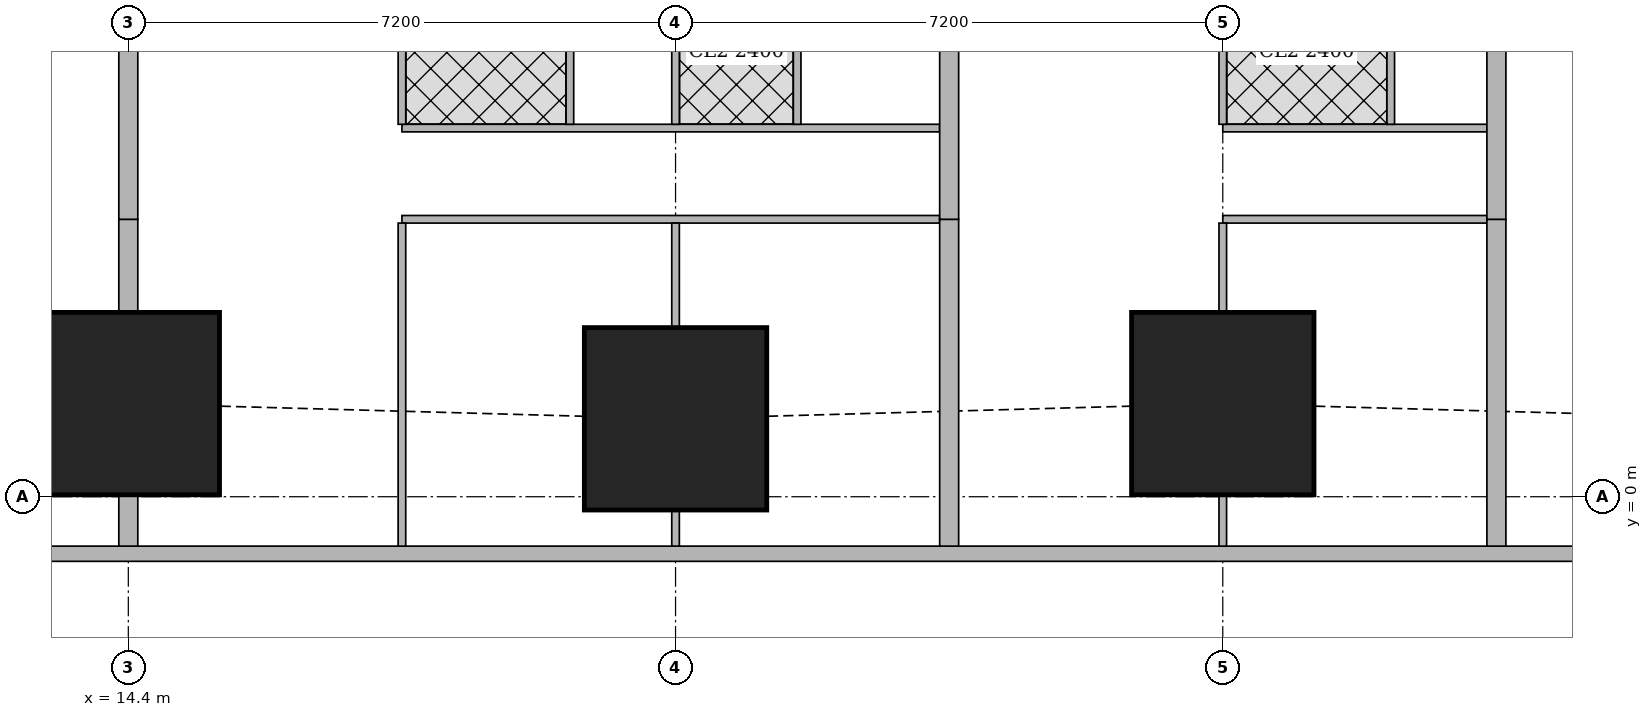
"""IFC4 building model, lengths in metres.
Left out: names, types, materials, properties, quantities, classifications, styles, units other than length and angle.
Written with IfcOpenShell. Run it as: python <this file> out.ifc"""

import sys

from ifc_helpers import new_model, si_unit, direction, frame, frame_2d, origin, origin_2d, place, context, subcontext, project, spatial, rectangle, extrude, element, fill, save


model = new_model("IFC4")
c1 = context("Model", 3, precision=1e-05, world=origin(), true_north=direction((0.0, 1.0)))
c2 = subcontext(c1, "Body", "Model", "MODEL_VIEW")
j1 = project(units=[si_unit("LENGTHUNIT", "METRE"), si_unit("PLANEANGLEUNIT", "RADIAN")], contexts=[c1])
p1 = place(None, origin())
s1 = spatial("IfcSite", under=j1, at=p1, CompositionType="ELEMENT")
p2 = place(p1, origin())
s2 = spatial("IfcBuilding", under=s1, at=p2, CompositionType="ELEMENT")
p3 = place(p2, frame((0.0, 0.0, 216.2)))
s3 = spatial("IfcBuildingStorey", under=s2, at=p3, CompositionType="ELEMENT", Elevation=216.2)
for number, where, z_axis, x_axis in (
    (1, (14.4, 1.225, 0.0), (0.0, 0.0, 1.0), (1.0, 0.0, 0.0)),
    (2, (21.6, 1.025, 0.0), (0.0, 0.0, 1.0), (1.0, 0.0, 0.0)),
    (3, (28.8, 1.225, 0.0), (0.0, 0.0, 1.0), (1.0, 0.0, 0.0)),
):
    element("IfcColumn", number, at=place(p3, frame(where, z_axis=z_axis, x_axis=x_axis)), inside=s3, PredefinedType="COLUMN", context=c2, shape_type="SweptSolid", body=[
        extrude(rectangle(XDim=2.4, YDim=2.4, at=origin_2d()), origin(), (0.0, 0.0, 1.0), 3.75),
    ])
p4 = place(p3, frame((7.363, -0.75, 0.0), z_axis=(0.0, 0.0, 1.0), x_axis=(1.0, 0.0, 0.0)))
e4 = element("IfcWall", 4, at=p4, inside=s3, PredefinedType="SOLIDWALL", context=c2, shape_type="SweptSolid", body=[
    extrude(rectangle(XDim=40.428, YDim=0.2, at=frame_2d((20.214, 0.0))), origin(), (0.0, 0.0, 1.0), 3.5),
])
p5 = place(p4, frame((2.319, 0.0, 0.9)))
e5 = element("IfcOpeningElement", 5, at=p5, cuts=e4, PredefinedType="OPENING", context=c2, shape_type="SweptSolid", body=[
    extrude(rectangle(XDim=2.4, YDim=1.5, at=frame_2d((1.2, 0.75))), frame((0.0, 0.11, 0.0), z_axis=(0.0, -1.0, 0.0), x_axis=(1.0, 0.0, 0.0)), (0.0, 0.0, 1.0), 0.22),
])
p6 = place(p4, frame((7.937, 0.0, 0.9)))
e6 = element("IfcOpeningElement", 6, at=p6, cuts=e4, PredefinedType="OPENING", context=c2, shape_type="SweptSolid", body=[
    extrude(rectangle(XDim=1.8, YDim=1.5, at=frame_2d((0.9, 0.75))), frame((0.0, 0.11, 0.0), z_axis=(0.0, -1.0, 0.0), x_axis=(1.0, 0.0, 0.0)), (0.0, 0.0, 1.0), 0.22),
])
p7 = place(p4, frame((11.537, 0.0, 0.9)))
e7 = element("IfcOpeningElement", 7, at=p7, cuts=e4, PredefinedType="OPENING", context=c2, shape_type="SweptSolid", body=[
    extrude(rectangle(XDim=1.8, YDim=1.5, at=frame_2d((0.9, 0.75))), frame((0.0, 0.11, 0.0), z_axis=(0.0, -1.0, 0.0), x_axis=(1.0, 0.0, 0.0)), (0.0, 0.0, 1.0), 0.22),
])
p8 = place(p4, frame((15.137, 0.0, 0.9)))
e8 = element("IfcOpeningElement", 8, at=p8, cuts=e4, PredefinedType="OPENING", context=c2, shape_type="SweptSolid", body=[
    extrude(rectangle(XDim=1.8, YDim=1.5, at=frame_2d((0.9, 0.75))), frame((0.0, 0.11, 0.0), z_axis=(0.0, -1.0, 0.0), x_axis=(1.0, 0.0, 0.0)), (0.0, 0.0, 1.0), 0.22),
])
p9 = place(p4, frame((18.737, 0.0, 0.9)))
e9 = element("IfcOpeningElement", 9, at=p9, cuts=e4, PredefinedType="OPENING", context=c2, shape_type="SweptSolid", body=[
    extrude(rectangle(XDim=1.8, YDim=1.5, at=frame_2d((0.9, 0.75))), frame((0.0, 0.11, 0.0), z_axis=(0.0, -1.0, 0.0), x_axis=(1.0, 0.0, 0.0)), (0.0, 0.0, 1.0), 0.22),
])
p10 = place(p4, frame((22.337, 0.0, 0.9)))
e10 = element("IfcOpeningElement", 10, at=p10, cuts=e4, PredefinedType="OPENING", context=c2, shape_type="SweptSolid", body=[
    extrude(rectangle(XDim=1.8, YDim=1.5, at=frame_2d((0.9, 0.75))), frame((0.0, 0.11, 0.0), z_axis=(0.0, -1.0, 0.0), x_axis=(1.0, 0.0, 0.0)), (0.0, 0.0, 1.0), 0.22),
])
p11 = place(p4, frame((25.937, 0.0, 0.9)))
e11 = element("IfcOpeningElement", 11, at=p11, cuts=e4, PredefinedType="OPENING", context=c2, shape_type="SweptSolid", body=[
    extrude(rectangle(XDim=1.8, YDim=1.5, at=frame_2d((0.9, 0.75))), frame((0.0, 0.11, 0.0), z_axis=(0.0, -1.0, 0.0), x_axis=(1.0, 0.0, 0.0)), (0.0, 0.0, 1.0), 0.22),
])
p12 = place(p4, frame((29.537, 0.0, 0.9)))
e12 = element("IfcOpeningElement", 12, at=p12, cuts=e4, PredefinedType="OPENING", context=c2, shape_type="SweptSolid", body=[
    extrude(rectangle(XDim=1.8, YDim=1.5, at=frame_2d((0.9, 0.75))), frame((0.0, 0.11, 0.0), z_axis=(0.0, -1.0, 0.0), x_axis=(1.0, 0.0, 0.0)), (0.0, 0.0, 1.0), 0.22),
])
p13 = place(p4, frame((33.137, 0.0, 0.9)))
e13 = element("IfcOpeningElement", 13, at=p13, cuts=e4, PredefinedType="OPENING", context=c2, shape_type="SweptSolid", body=[
    extrude(rectangle(XDim=1.8, YDim=1.5, at=frame_2d((0.9, 0.75))), frame((0.0, 0.11, 0.0), z_axis=(0.0, -1.0, 0.0), x_axis=(1.0, 0.0, 0.0)), (0.0, 0.0, 1.0), 0.22),
])
p14 = place(p3, frame((25.075, 3.65, 0.0), z_axis=(0.0, 0.0, 1.0), x_axis=(-1.0, 0.0, 0.0)))
e14 = element("IfcWall", 14, at=p14, inside=s3, PredefinedType="PARTITIONING", context=c2, shape_type="SweptSolid", body=[
    extrude(rectangle(XDim=7.075, YDim=0.1, at=frame_2d((3.538, 0.0))), origin(), (0.0, 0.0, 1.0), 3.5),
])
p15 = place(p14, frame((5.975, 0.0, 0.0)))
e15 = element("IfcOpeningElement", 15, at=p15, cuts=e14, PredefinedType="OPENING", context=c2, shape_type="SweptSolid", body=[
    extrude(rectangle(XDim=0.9, YDim=2.1, at=frame_2d((0.45, 1.05))), frame((0.0, 0.06, 0.0), z_axis=(0.0, -1.0, 0.0), x_axis=(1.0, 0.0, 0.0)), (0.0, 0.0, 1.0), 0.12),
])
p16 = place(p14, frame((2.375, 0.0, 0.0)))
e16 = element("IfcOpeningElement", 16, at=p16, cuts=e14, PredefinedType="OPENING", context=c2, shape_type="SweptSolid", body=[
    extrude(rectangle(XDim=0.9, YDim=2.1, at=frame_2d((0.45, 1.05))), frame((0.0, 0.06, 0.0), z_axis=(0.0, -1.0, 0.0), x_axis=(1.0, 0.0, 0.0)), (0.0, 0.0, 1.0), 0.12),
])
p17 = place(p3, frame((25.075, 4.85, 0.0), z_axis=(0.0, 0.0, 1.0), x_axis=(-1.0, 0.0, 0.0)))
e17 = element("IfcWall", 17, at=p17, inside=s3, PredefinedType="PARTITIONING", context=c2, shape_type="SweptSolid", body=[
    extrude(rectangle(XDim=7.075, YDim=0.1, at=frame_2d((3.538, 0.0))), origin(), (0.0, 0.0, 1.0), 3.5),
])
p18 = place(p17, frame((5.52, 0.0, 0.0)))
e18 = element("IfcOpeningElement", 18, at=p18, cuts=e17, PredefinedType="OPENING", context=c2, shape_type="SweptSolid", body=[
    extrude(rectangle(XDim=0.9, YDim=2.1, at=frame_2d((0.45, 1.05))), frame((0.0, 0.06, 0.0), z_axis=(0.0, -1.0, 0.0), x_axis=(1.0, 0.0, 0.0)), (0.0, 0.0, 1.0), 0.12),
])
p19 = place(p17, frame((2.225, 0.0, 0.0)))
e19 = element("IfcOpeningElement", 19, at=p19, cuts=e17, PredefinedType="OPENING", context=c2, shape_type="SweptSolid", body=[
    extrude(rectangle(XDim=0.9, YDim=2.1, at=frame_2d((0.45, 1.05))), frame((0.0, 0.06, 0.0), z_axis=(0.0, -1.0, 0.0), x_axis=(1.0, 0.0, 0.0)), (0.0, 0.0, 1.0), 0.12),
])
p20 = place(p17, frame((3.72, 0.0, 0.0)))
e20 = element("IfcOpeningElement", 20, at=p20, cuts=e17, PredefinedType="OPENING", context=c2, shape_type="SweptSolid", body=[
    extrude(rectangle(XDim=0.9, YDim=2.1, at=frame_2d((0.45, 1.05))), frame((0.0, 0.06, 0.0), z_axis=(0.0, -1.0, 0.0), x_axis=(1.0, 0.0, 0.0)), (0.0, 0.0, 1.0), 0.12),
])
p21 = place(p17, frame((0.425, 0.0, 0.0)))
e21 = element("IfcOpeningElement", 21, at=p21, cuts=e17, PredefinedType="OPENING", context=c2, shape_type="SweptSolid", body=[
    extrude(rectangle(XDim=0.9, YDim=2.1, at=frame_2d((0.45, 1.05))), frame((0.0, 0.06, 0.0), z_axis=(0.0, -1.0, 0.0), x_axis=(1.0, 0.0, 0.0)), (0.0, 0.0, 1.0), 0.12),
])
p22 = place(p3, frame((18.0, -0.65, 0.0), z_axis=(0.0, 0.0, 1.0), x_axis=(0.0, 1.0, 0.0)))
e22 = element("IfcWall", 22, at=p22, inside=s3, PredefinedType="PARTITIONING", context=c2, shape_type="SweptSolid", body=[
    extrude(rectangle(XDim=4.25, YDim=0.1, at=frame_2d((2.125, 0.0))), origin(), (0.0, 0.0, 1.0), 2.05),
])
p23 = place(p3, frame((21.6, -0.65, 0.0), z_axis=(0.0, 0.0, 1.0), x_axis=(0.0, 1.0, 0.0)))
e23 = element("IfcWall", 23, at=p23, inside=s3, PredefinedType="PARTITIONING", context=c2, shape_type="SweptSolid", body=[
    extrude(rectangle(XDim=0.474, YDim=0.1, at=frame_2d((0.237, 0.0))), origin(), (0.0, 0.0, 1.0), 3.5),
])
p24 = place(p3, frame((21.6, 2.226, 0.0), z_axis=(0.0, 0.0, 1.0), x_axis=(0.0, 1.0, 0.0)))
e24 = element("IfcWall", 24, at=p24, inside=s3, PredefinedType="PARTITIONING", context=c2, shape_type="SweptSolid", body=[
    extrude(rectangle(XDim=1.374, YDim=0.1, at=frame_2d((0.687, 0.0))), origin(), (0.0, 0.0, 1.0), 3.5),
])
p25 = place(p3, frame((18.0, 4.9, 0.0), z_axis=(0.0, 0.0, 1.0), x_axis=(0.0, 1.0, 0.0)))
e25 = element("IfcWall", 25, at=p25, inside=s3, PredefinedType="PARTITIONING", context=c2, shape_type="SweptSolid", body=[
    extrude(rectangle(XDim=3.275, YDim=0.1, at=frame_2d((1.638, 0.0))), origin(), (0.0, 0.0, 1.0), 3.5),
])
p26 = place(p3, frame((21.6, 4.9, 0.0), z_axis=(0.0, 0.0, 1.0), x_axis=(0.0, 1.0, 0.0)))
e26 = element("IfcWall", 26, at=p26, inside=s3, PredefinedType="PARTITIONING", context=c2, shape_type="SweptSolid", body=[
    extrude(rectangle(XDim=1.899, YDim=0.1, at=frame_2d((0.95, 0.0))), origin(), (0.0, 0.0, 1.0), 3.5),
])
for number, where, z_axis, x_axis in (
    (27, (20.21, 4.9, 0.0), (0.0, 0.0, 1.0), (0.0, 1.0, 0.0)),
    (28, (23.2, 4.9, 0.0), (0.0, 0.0, 1.0), (0.0, 1.0, 0.0)),
):
    element("IfcWall", number, at=place(p3, frame(where, z_axis=z_axis, x_axis=x_axis)), inside=s3, PredefinedType="PARTITIONING", context=c2, shape_type="SweptSolid", body=[
        extrude(rectangle(XDim=3.275, YDim=0.1, at=frame_2d((1.638, 0.0))), origin(), (0.0, 0.0, 1.0), 3.5),
    ])
p27 = place(p3, frame((14.4, -0.65, 0.0), z_axis=(0.0, 0.0, 1.0), x_axis=(0.0, 1.0, 0.0)))
e29 = element("IfcWall", 29, at=p27, inside=s3, PredefinedType="SOLIDWALL", context=c2, shape_type="SweptSolid", body=[
    extrude(rectangle(XDim=0.674, YDim=0.25, at=frame_2d((0.337, 0.0))), origin(), (0.0, 0.0, 1.0), 2.05),
])
p28 = place(p3, frame((14.4, 2.426, 0.0), z_axis=(0.0, 0.0, 1.0), x_axis=(0.0, 1.0, 0.0)))
e30 = element("IfcWall", 30, at=p28, inside=s3, PredefinedType="SOLIDWALL", context=c2, shape_type="SweptSolid", body=[
    extrude(rectangle(XDim=1.224, YDim=0.25, at=frame_2d((0.612, 0.0))), origin(), (0.0, 0.0, 1.0), 2.05),
])
p29 = place(p3, frame((14.4, 3.65, 0.0), z_axis=(0.0, 0.0, 1.0), x_axis=(0.0, 1.0, 0.0)))
e31 = element("IfcWall", 31, at=p29, inside=s3, PredefinedType="SOLIDWALL", context=c2, shape_type="SweptSolid", body=[
    extrude(rectangle(XDim=3.149, YDim=0.25, at=frame_2d((1.575, 0.0))), origin(), (0.0, 0.0, 1.0), 3.5),
])
p30 = place(p3, frame((32.275, 3.65, 0.0), z_axis=(0.0, 0.0, 1.0), x_axis=(-1.0, 0.0, 0.0)))
e32 = element("IfcWall", 32, at=p30, inside=s3, PredefinedType="PARTITIONING", context=c2, shape_type="SweptSolid", body=[
    extrude(rectangle(XDim=3.475, YDim=0.1, at=frame_2d((1.737, 0.0))), origin(), (0.0, 0.0, 1.0), 3.5),
])
p31 = place(p30, frame((1.35, 0.0, 0.0)))
e33 = element("IfcOpeningElement", 33, at=p31, cuts=e32, PredefinedType="OPENING", context=c2, shape_type="SweptSolid", body=[
    extrude(rectangle(XDim=0.9, YDim=2.1, at=frame_2d((0.45, 1.05))), frame((0.0, 0.06, 0.0), z_axis=(0.0, -1.0, 0.0), x_axis=(1.0, 0.0, 0.0)), (0.0, 0.0, 1.0), 0.12),
])
p32 = place(p3, frame((32.275, 4.85, 0.0), z_axis=(0.0, 0.0, 1.0), x_axis=(-1.0, 0.0, 0.0)))
e34 = element("IfcWall", 34, at=p32, inside=s3, PredefinedType="PARTITIONING", context=c2, shape_type="SweptSolid", body=[
    extrude(rectangle(XDim=3.475, YDim=0.1, at=frame_2d((1.737, 0.0))), origin(), (0.0, 0.0, 1.0), 3.5),
])
p33 = place(p32, frame((1.92, 0.0, 0.0)))
e35 = element("IfcOpeningElement", 35, at=p33, cuts=e34, PredefinedType="OPENING", context=c2, shape_type="SweptSolid", body=[
    extrude(rectangle(XDim=0.9, YDim=2.1, at=frame_2d((0.45, 1.05))), frame((0.0, 0.06, 0.0), z_axis=(0.0, -1.0, 0.0), x_axis=(1.0, 0.0, 0.0)), (0.0, 0.0, 1.0), 0.12),
])
p34 = place(p32, frame((0.15, 0.0, 0.0)))
e36 = element("IfcOpeningElement", 36, at=p34, cuts=e34, PredefinedType="OPENING", context=c2, shape_type="SweptSolid", body=[
    extrude(rectangle(XDim=0.9, YDim=2.1, at=frame_2d((0.45, 1.05))), frame((0.0, 0.06, 0.0), z_axis=(0.0, -1.0, 0.0), x_axis=(1.0, 0.0, 0.0)), (0.0, 0.0, 1.0), 0.12),
])
p35 = place(p3, frame((28.8, -0.65, 0.0), z_axis=(0.0, 0.0, 1.0), x_axis=(0.0, 1.0, 0.0)))
e37 = element("IfcWall", 37, at=p35, inside=s3, PredefinedType="PARTITIONING", context=c2, shape_type="SweptSolid", body=[
    extrude(rectangle(XDim=0.674, YDim=0.1, at=frame_2d((0.337, 0.0))), origin(), (0.0, 0.0, 1.0), 3.5),
])
p36 = place(p3, frame((28.8, 2.426, 0.0), z_axis=(0.0, 0.0, 1.0), x_axis=(0.0, 1.0, 0.0)))
e38 = element("IfcWall", 38, at=p36, inside=s3, PredefinedType="PARTITIONING", context=c2, shape_type="SweptSolid", body=[
    extrude(rectangle(XDim=1.174, YDim=0.1, at=frame_2d((0.587, 0.0))), origin(), (0.0, 0.0, 1.0), 3.5),
])
p37 = place(p3, frame((28.8, 4.9, 0.0), z_axis=(0.0, 0.0, 1.0), x_axis=(0.0, 1.0, 0.0)))
e39 = element("IfcWall", 39, at=p37, inside=s3, PredefinedType="PARTITIONING", context=c2, shape_type="SweptSolid", body=[
    extrude(rectangle(XDim=1.899, YDim=0.1, at=frame_2d((0.95, 0.0))), origin(), (0.0, 0.0, 1.0), 3.5),
])
p38 = place(p3, frame((31.01, 4.9, 0.0), z_axis=(0.0, 0.0, 1.0), x_axis=(0.0, 1.0, 0.0)))
e40 = element("IfcWall", 40, at=p38, inside=s3, PredefinedType="PARTITIONING", context=c2, shape_type="SweptSolid", body=[
    extrude(rectangle(XDim=3.275, YDim=0.1, at=frame_2d((1.638, 0.0))), origin(), (0.0, 0.0, 1.0), 3.5),
])
p39 = place(p3, frame((25.2, -0.65, 0.0), z_axis=(0.0, 0.0, 1.0), x_axis=(0.0, 1.0, 0.0)))
e41 = element("IfcWall", 41, at=p39, inside=s3, PredefinedType="SOLIDWALL", context=c2, shape_type="SweptSolid", body=[
    extrude(rectangle(XDim=4.3, YDim=0.25, at=frame_2d((2.15, 0.0))), origin(), (0.0, 0.0, 1.0), 2.05),
])
p40 = place(p3, frame((25.2, 3.65, 0.0), z_axis=(0.0, 0.0, 1.0), x_axis=(0.0, 1.0, 0.0)))
e42 = element("IfcWall", 42, at=p40, inside=s3, PredefinedType="SOLIDWALL", context=c2, shape_type="SweptSolid", body=[
    extrude(rectangle(XDim=4.525, YDim=0.25, at=frame_2d((2.263, 0.0))), origin(), (0.0, 0.0, 1.0), 3.5),
])
p41 = place(p3, frame((32.4, -0.65, 0.0), z_axis=(0.0, 0.0, 1.0), x_axis=(0.0, 1.0, 0.0)))
e43 = element("IfcWall", 43, at=p41, inside=s3, PredefinedType="SOLIDWALL", context=c2, shape_type="SweptSolid", body=[
    extrude(rectangle(XDim=4.3, YDim=0.25, at=frame_2d((2.15, 0.0))), origin(), (0.0, 0.0, 1.0), 2.05),
])
p42 = place(p3, frame((32.4, 3.65, 0.0), z_axis=(0.0, 0.0, 1.0), x_axis=(0.0, 1.0, 0.0)))
e44 = element("IfcWall", 44, at=p42, inside=s3, PredefinedType="SOLIDWALL", context=c2, shape_type="SweptSolid", body=[
    extrude(rectangle(XDim=4.525, YDim=0.25, at=frame_2d((2.263, 0.0))), origin(), (0.0, 0.0, 1.0), 3.5),
])
p43 = place(p6, origin())
e45 = element("IfcWindow", 45, at=p43, inside=s3, PartitioningType="SINGLE_PANEL", PredefinedType="WINDOW", context=c2, shape_type="SweptSolid", body=[
    extrude(rectangle(XDim=1.8, YDim=1.5, at=frame_2d((0.9, 0.75))), frame((0.0, 0.03, 0.0), z_axis=(0.0, -1.0, 0.0), x_axis=(1.0, 0.0, 0.0)), (0.0, 0.0, 1.0), 0.06),
])
fill(e6, e45)
p44 = place(p7, origin())
e46 = element("IfcWindow", 46, at=p44, inside=s3, PartitioningType="SINGLE_PANEL", PredefinedType="WINDOW", context=c2, shape_type="SweptSolid", body=[
    extrude(rectangle(XDim=1.8, YDim=1.5, at=frame_2d((0.9, 0.75))), frame((0.0, 0.03, 0.0), z_axis=(0.0, -1.0, 0.0), x_axis=(1.0, 0.0, 0.0)), (0.0, 0.0, 1.0), 0.06),
])
fill(e7, e46)
p45 = place(p8, origin())
e47 = element("IfcWindow", 47, at=p45, inside=s3, PartitioningType="SINGLE_PANEL", PredefinedType="WINDOW", context=c2, shape_type="SweptSolid", body=[
    extrude(rectangle(XDim=1.8, YDim=1.5, at=frame_2d((0.9, 0.75))), frame((0.0, 0.03, 0.0), z_axis=(0.0, -1.0, 0.0), x_axis=(1.0, 0.0, 0.0)), (0.0, 0.0, 1.0), 0.06),
])
fill(e8, e47)
p46 = place(p9, origin())
e48 = element("IfcWindow", 48, at=p46, inside=s3, PartitioningType="SINGLE_PANEL", PredefinedType="WINDOW", context=c2, shape_type="SweptSolid", body=[
    extrude(rectangle(XDim=1.8, YDim=1.5, at=frame_2d((0.9, 0.75))), frame((0.0, 0.03, 0.0), z_axis=(0.0, -1.0, 0.0), x_axis=(1.0, 0.0, 0.0)), (0.0, 0.0, 1.0), 0.06),
])
fill(e9, e48)
p47 = place(p10, origin())
e49 = element("IfcWindow", 49, at=p47, inside=s3, PartitioningType="SINGLE_PANEL", PredefinedType="WINDOW", context=c2, shape_type="SweptSolid", body=[
    extrude(rectangle(XDim=1.8, YDim=1.5, at=frame_2d((0.9, 0.75))), frame((0.0, 0.03, 0.0), z_axis=(0.0, -1.0, 0.0), x_axis=(1.0, 0.0, 0.0)), (0.0, 0.0, 1.0), 0.06),
])
fill(e10, e49)
p48 = place(p11, origin())
e50 = element("IfcWindow", 50, at=p48, inside=s3, PartitioningType="SINGLE_PANEL", PredefinedType="WINDOW", context=c2, shape_type="SweptSolid", body=[
    extrude(rectangle(XDim=1.8, YDim=1.5, at=frame_2d((0.9, 0.75))), frame((0.0, 0.03, 0.0), z_axis=(0.0, -1.0, 0.0), x_axis=(1.0, 0.0, 0.0)), (0.0, 0.0, 1.0), 0.06),
])
fill(e11, e50)
p49 = place(p15, origin())
e51 = element("IfcDoor", 51, at=p49, inside=s3, OperationType="SINGLE_SWING_RIGHT", PredefinedType="DOOR", context=c2, shape_type="SweptSolid", body=[
    extrude(rectangle(XDim=0.9, YDim=2.1, at=frame_2d((0.45, 1.05))), frame((0.0, 0.025, 0.0), z_axis=(0.0, -1.0, 0.0), x_axis=(1.0, 0.0, 0.0)), (0.0, 0.0, 1.0), 0.05),
])
fill(e15, e51)
p50 = place(p16, origin())
e52 = element("IfcDoor", 52, at=p50, inside=s3, OperationType="SINGLE_SWING_RIGHT", PredefinedType="DOOR", context=c2, shape_type="SweptSolid", body=[
    extrude(rectangle(XDim=0.9, YDim=2.1, at=frame_2d((0.45, 1.05))), frame((0.0, 0.025, 0.0), z_axis=(0.0, -1.0, 0.0), x_axis=(1.0, 0.0, 0.0)), (0.0, 0.0, 1.0), 0.05),
])
fill(e16, e52)
p51 = place(p18, origin())
e53 = element("IfcDoor", 53, at=p51, inside=s3, OperationType="SINGLE_SWING_LEFT", PredefinedType="DOOR", context=c2, shape_type="SweptSolid", body=[
    extrude(rectangle(XDim=0.9, YDim=2.1, at=frame_2d((0.45, 1.05))), frame((0.0, 0.025, 0.0), z_axis=(0.0, -1.0, 0.0), x_axis=(1.0, 0.0, 0.0)), (0.0, 0.0, 1.0), 0.05),
])
fill(e18, e53)
p52 = place(p19, origin())
e54 = element("IfcDoor", 54, at=p52, inside=s3, OperationType="SINGLE_SWING_RIGHT", PredefinedType="DOOR", context=c2, shape_type="SweptSolid", body=[
    extrude(rectangle(XDim=0.9, YDim=2.1, at=frame_2d((0.45, 1.05))), frame((0.0, 0.025, 0.0), z_axis=(0.0, -1.0, 0.0), x_axis=(1.0, 0.0, 0.0)), (0.0, 0.0, 1.0), 0.05),
])
fill(e19, e54)
p53 = place(p20, origin())
e55 = element("IfcDoor", 55, at=p53, inside=s3, OperationType="SINGLE_SWING_RIGHT", PredefinedType="DOOR", context=c2, shape_type="SweptSolid", body=[
    extrude(rectangle(XDim=0.9, YDim=2.1, at=frame_2d((0.45, 1.05))), frame((0.0, 0.025, 0.0), z_axis=(0.0, -1.0, 0.0), x_axis=(1.0, 0.0, 0.0)), (0.0, 0.0, 1.0), 0.05),
])
fill(e20, e55)
p54 = place(p21, origin())
e56 = element("IfcDoor", 56, at=p54, inside=s3, OperationType="SINGLE_SWING_RIGHT", PredefinedType="DOOR", context=c2, shape_type="SweptSolid", body=[
    extrude(rectangle(XDim=0.9, YDim=2.1, at=frame_2d((0.45, 1.05))), frame((0.0, 0.025, 0.0), z_axis=(0.0, -1.0, 0.0), x_axis=(1.0, 0.0, 0.0)), (0.0, 0.0, 1.0), 0.05),
])
fill(e21, e56)
p55 = place(p31, origin())
e57 = element("IfcDoor", 57, at=p55, inside=s3, OperationType="SINGLE_SWING_RIGHT", PredefinedType="DOOR", context=c2, shape_type="SweptSolid", body=[
    extrude(rectangle(XDim=0.9, YDim=2.1, at=frame_2d((0.45, 1.05))), frame((0.0, 0.025, 0.0), z_axis=(0.0, -1.0, 0.0), x_axis=(1.0, 0.0, 0.0)), (0.0, 0.0, 1.0), 0.05),
])
fill(e33, e57)
p56 = place(p33, origin())
e58 = element("IfcDoor", 58, at=p56, inside=s3, OperationType="SINGLE_SWING_LEFT", PredefinedType="DOOR", context=c2, shape_type="SweptSolid", body=[
    extrude(rectangle(XDim=0.9, YDim=2.1, at=frame_2d((0.45, 1.05))), frame((0.0, 0.025, 0.0), z_axis=(0.0, -1.0, 0.0), x_axis=(1.0, 0.0, 0.0)), (0.0, 0.0, 1.0), 0.05),
])
fill(e35, e58)
p57 = place(p34, origin())
e59 = element("IfcDoor", 59, at=p57, inside=s3, OperationType="SINGLE_SWING_RIGHT", PredefinedType="DOOR", context=c2, shape_type="SweptSolid", body=[
    extrude(rectangle(XDim=0.9, YDim=2.1, at=frame_2d((0.45, 1.05))), frame((0.0, 0.025, 0.0), z_axis=(0.0, -1.0, 0.0), x_axis=(1.0, 0.0, 0.0)), (0.0, 0.0, 1.0), 0.05),
])
fill(e36, e59)
save(model, sys.argv[1])
